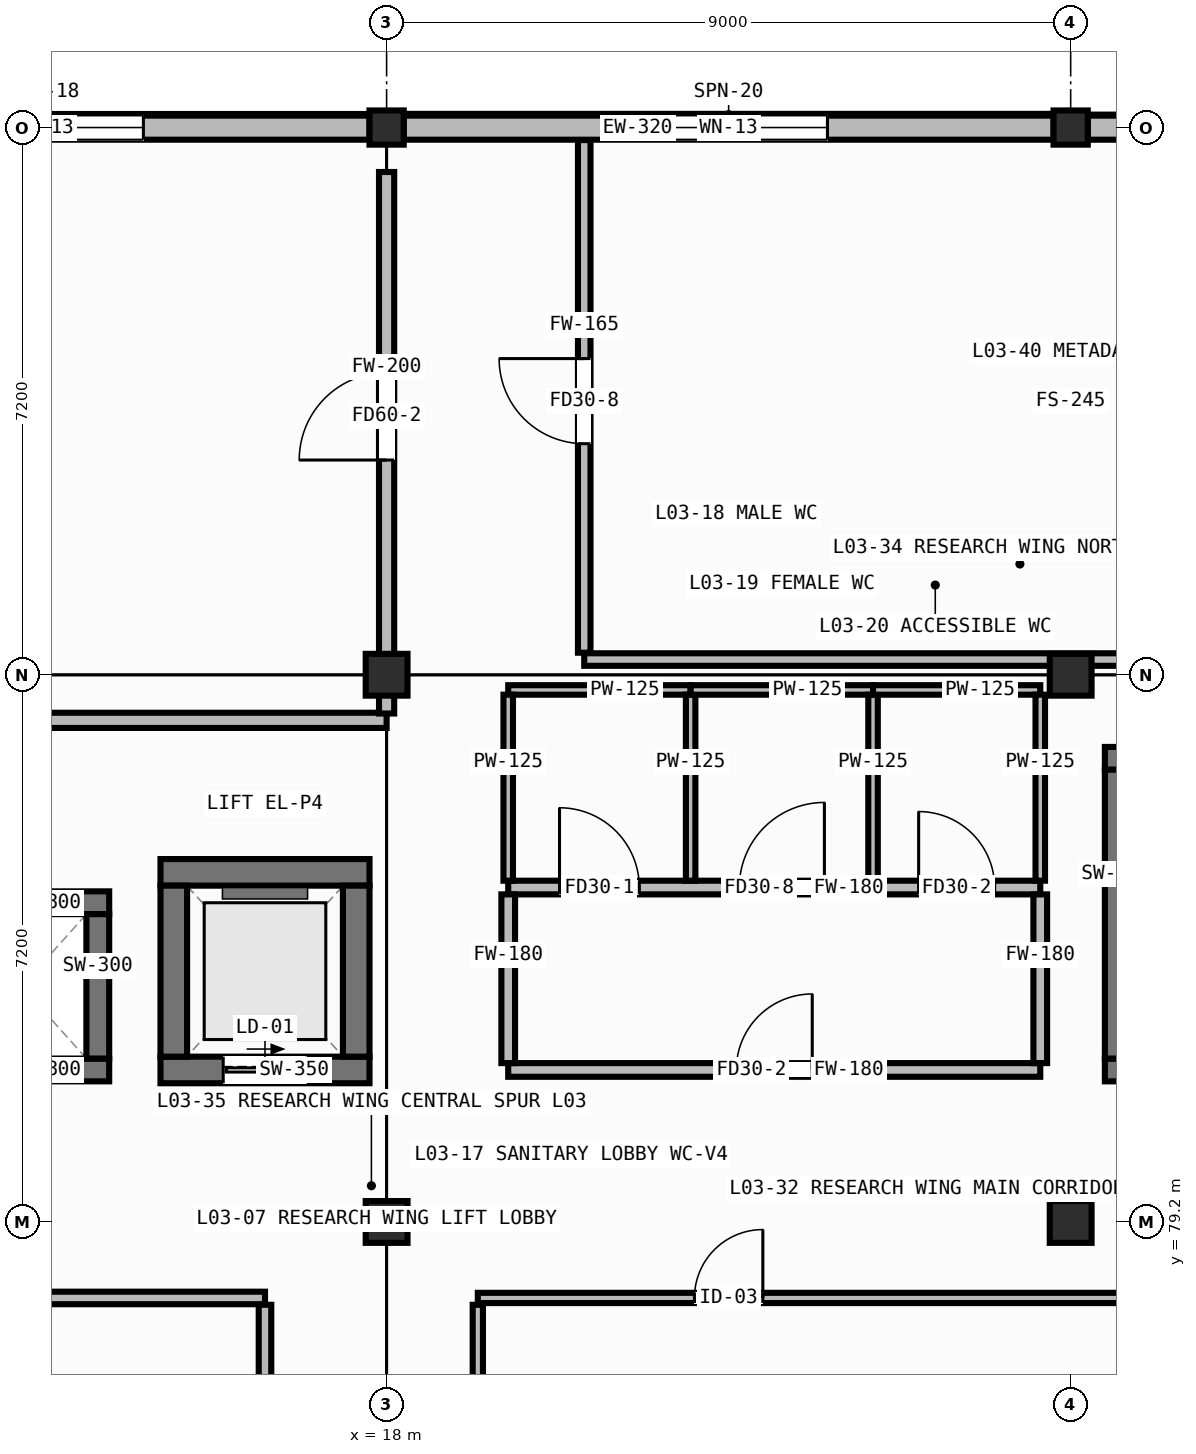
"""IFC4 building model, lengths in metres.
Left out: names, types, materials, properties, quantities, classifications, styles, units other than length and angle.
Written with IfcOpenShell. Run it as: python <this file> out.ifc"""

import sys

from ifc_helpers import new_model, si_unit, direction, frame, frame_2d, origin, origin_2d, place, context, subcontext, project, spatial, rectangle, hollow_rectangle, extrude, element, fill, save


model = new_model("IFC4")
c1 = context("Model", 3, precision=1e-05, world=origin(), true_north=direction((0.0, 1.0)))
c2 = subcontext(c1, "Body", "Model", "MODEL_VIEW")
j1 = project(units=[si_unit("LENGTHUNIT", "METRE"), si_unit("PLANEANGLEUNIT", "RADIAN")], contexts=[c1])
p1 = place(None, origin())
s1 = spatial("IfcSite", under=j1, at=p1, CompositionType="ELEMENT")
p2 = place(p1, origin())
s2 = spatial("IfcBuilding", under=s1, at=p2, CompositionType="ELEMENT")
p3 = place(p2, frame((0.0, 0.0, 8.8)))
s3 = spatial("IfcBuildingStorey", under=s2, at=p3, CompositionType="ELEMENT", Elevation=8.8)
for number, where, z_axis, x_axis in (
    (1, (18.0, 79.2, 0.0), (0.0, 0.0, 1.0), (1.0, 0.0, 0.0)),
    (2, (18.0, 86.4, 0.0), (0.0, 0.0, 1.0), (1.0, 0.0, 0.0)),
):
    element("IfcColumn", number, at=place(p3, frame(where, z_axis=z_axis, x_axis=x_axis)), inside=s3, PredefinedType="COLUMN", context=c2, shape_type="SweptSolid", body=[
        extrude(hollow_rectangle(XDim=0.55, YDim=0.55, WallThickness=0.022, at=origin_2d()), origin(), (0.0, 0.0, 1.0), 4.0),
    ])
p4 = place(p3, frame((18.0, 93.6, 0.0), z_axis=(0.0, 0.0, 1.0), x_axis=(1.0, 0.0, 0.0)))
e3 = element("IfcColumn", 3, at=p4, inside=s3, PredefinedType="COLUMN", context=c2, shape_type="SweptSolid", body=[
    extrude(hollow_rectangle(XDim=0.45, YDim=0.45, WallThickness=0.019, at=origin_2d()), origin(), (0.0, 0.0, 1.0), 4.0),
])
for number, where, z_axis, x_axis in (
    (4, (27.0, 79.2, 0.0), (0.0, 0.0, 1.0), (1.0, 0.0, 0.0)),
    (5, (27.0, 86.4, 0.0), (0.0, 0.0, 1.0), (1.0, 0.0, 0.0)),
):
    element("IfcColumn", number, at=place(p3, frame(where, z_axis=z_axis, x_axis=x_axis)), inside=s3, PredefinedType="COLUMN", context=c2, shape_type="SweptSolid", body=[
        extrude(hollow_rectangle(XDim=0.55, YDim=0.55, WallThickness=0.022, at=origin_2d()), origin(), (0.0, 0.0, 1.0), 4.0),
    ])
p5 = place(p3, frame((27.0, 93.6, 0.0), z_axis=(0.0, 0.0, 1.0), x_axis=(1.0, 0.0, 0.0)))
e6 = element("IfcColumn", 6, at=p5, inside=s3, PredefinedType="COLUMN", context=c2, shape_type="SweptSolid", body=[
    extrude(hollow_rectangle(XDim=0.45, YDim=0.45, WallThickness=0.019, at=origin_2d()), origin(), (0.0, 0.0, 1.0), 4.0),
])
p6 = place(p3, frame((17.775, 93.6, 0.0), z_axis=(0.0, 0.0, 1.0), x_axis=(-1.0, 0.0, 0.0)))
e7 = element("IfcWall", 7, at=p6, inside=s3, PredefinedType="STANDARD", context=c2, shape_type="SweptSolid", body=[
    extrude(rectangle(XDim=8.55, YDim=0.32, at=frame_2d((4.275, 0.0))), origin(), (0.0, 0.0, 1.0), 3.295),
])
p7 = place(p6, frame((2.975, 0.0, 0.85)))
e8 = element("IfcOpeningElement", 8, at=p7, cuts=e7, PredefinedType="OPENING", context=c2, shape_type="SweptSolid", body=[
    extrude(rectangle(XDim=2.6, YDim=1.6, at=frame_2d((1.3, 0.8))), frame((0.0, 0.172, 0.0), z_axis=(0.0, -1.0, 0.0), x_axis=(1.0, 0.0, 0.0)), (0.0, 0.0, 1.0), 0.344),
])
p8 = place(p3, frame((26.775, 93.6, 0.0), z_axis=(0.0, 0.0, 1.0), x_axis=(-1.0, 0.0, 0.0)))
e9 = element("IfcWall", 9, at=p8, inside=s3, PredefinedType="STANDARD", context=c2, shape_type="SweptSolid", body=[
    extrude(rectangle(XDim=8.55, YDim=0.32, at=frame_2d((4.275, 0.0))), origin(), (0.0, 0.0, 1.0), 3.295),
])
p9 = place(p8, frame((2.975, 0.0, 0.85)))
e10 = element("IfcOpeningElement", 10, at=p9, cuts=e9, PredefinedType="OPENING", context=c2, shape_type="SweptSolid", body=[
    extrude(rectangle(XDim=2.6, YDim=1.6, at=frame_2d((1.3, 0.8))), frame((0.0, 0.172, 0.0), z_axis=(0.0, -1.0, 0.0), x_axis=(1.0, 0.0, 0.0)), (0.0, 0.0, 1.0), 0.344),
])
p10 = place(p3, frame((35.775, 93.6, 0.0), z_axis=(0.0, 0.0, 1.0), x_axis=(-1.0, 0.0, 0.0)))
e11 = element("IfcWall", 11, at=p10, inside=s3, PredefinedType="STANDARD", context=c2, shape_type="SweptSolid", body=[
    extrude(rectangle(XDim=8.55, YDim=0.32, at=frame_2d((4.275, 0.0))), origin(), (0.0, 0.0, 1.0), 3.295),
])
p11 = place(p10, frame((2.975, 0.0, 0.85)))
e12 = element("IfcOpeningElement", 12, at=p11, cuts=e11, PredefinedType="OPENING", context=c2, shape_type="SweptSolid", body=[
    extrude(rectangle(XDim=2.6, YDim=1.6, at=frame_2d((1.3, 0.8))), frame((0.0, 0.172, 0.0), z_axis=(0.0, -1.0, 0.0), x_axis=(1.0, 0.0, 0.0)), (0.0, 0.0, 1.0), 0.344),
])
p12 = place(p3, frame((27.45, 81.2, 0.0), z_axis=(0.0, 0.0, 1.0), x_axis=(1.0, 0.0, 0.0)))
e13 = element("IfcWall", 13, at=p12, inside=s3, PredefinedType="SHEAR", context=c2, shape_type="SweptSolid", body=[
    extrude(rectangle(XDim=8.1, YDim=0.3, at=frame_2d((4.05, 0.0))), origin(), (0.0, 0.0, 1.0), 3.745),
])
p13 = place(p12, frame((0.5, 0.0, 0.0)))
e14 = element("IfcOpeningElement", 14, at=p13, cuts=e13, PredefinedType="OPENING", context=c2, shape_type="SweptSolid", body=[
    extrude(rectangle(XDim=1.2, YDim=2.1, at=frame_2d((0.6, 1.05))), frame((0.0, 0.162, 0.0), z_axis=(0.0, -1.0, 0.0), x_axis=(1.0, 0.0, 0.0)), (0.0, 0.0, 1.0), 0.324),
])
p14 = place(p3, frame((27.45, 85.3, 0.0), z_axis=(0.0, 0.0, 1.0), x_axis=(1.0, 0.0, 0.0)))
e15 = element("IfcWall", 15, at=p14, inside=s3, PredefinedType="SHEAR", context=c2, shape_type="SweptSolid", body=[
    extrude(rectangle(XDim=8.1, YDim=0.3, at=frame_2d((4.05, 0.0))), origin(), (0.0, 0.0, 1.0), 3.745),
])
p15 = place(p3, frame((27.6, 81.35, 0.0), z_axis=(0.0, 0.0, 1.0), x_axis=(0.0, 1.0, 0.0)))
e16 = element("IfcWall", 16, at=p15, inside=s3, PredefinedType="SHEAR", context=c2, shape_type="SweptSolid", body=[
    extrude(rectangle(XDim=3.8, YDim=0.3, at=frame_2d((1.9, 0.0))), origin(), (0.0, 0.0, 1.0), 3.745),
])
p16 = place(p3, frame((15.025, 81.2, 0.0), z_axis=(0.0, 0.0, 1.0), x_axis=(1.0, 0.0, 0.0)))
e17 = element("IfcWall", 17, at=p16, inside=s3, PredefinedType="SHEAR", context=c2, shape_type="SweptSolid", body=[
    extrude(rectangle(XDim=2.75, YDim=0.35, at=frame_2d((1.375, 0.0))), origin(), (0.0, 0.0, 1.0), 3.745),
])
p17 = place(p16, frame((0.825, 0.0, 0.0)))
e18 = element("IfcOpeningElement", 18, at=p17, cuts=e17, PredefinedType="OPENING", context=c2, shape_type="SweptSolid", body=[
    extrude(rectangle(XDim=1.1, YDim=2.1, at=frame_2d((0.55, 1.05))), frame((0.0, 0.187, 0.0), z_axis=(0.0, -1.0, 0.0), x_axis=(1.0, 0.0, 0.0)), (0.0, 0.0, 1.0), 0.374),
])
p18 = place(p3, frame((15.025, 83.8, 0.0), z_axis=(0.0, 0.0, 1.0), x_axis=(1.0, 0.0, 0.0)))
e19 = element("IfcWall", 19, at=p18, inside=s3, PredefinedType="SHEAR", context=c2, shape_type="SweptSolid", body=[
    extrude(rectangle(XDim=2.75, YDim=0.35, at=frame_2d((1.375, 0.0))), origin(), (0.0, 0.0, 1.0), 3.745),
])
for number, where, z_axis, x_axis in (
    (20, (15.2, 81.375, 0.0), (0.0, 0.0, 1.0), (0.0, 1.0, 0.0)),
    (21, (17.6, 81.375, 0.0), (0.0, 0.0, 1.0), (0.0, 1.0, 0.0)),
):
    element("IfcWall", number, at=place(p3, frame(where, z_axis=z_axis, x_axis=x_axis)), inside=s3, PredefinedType="SHEAR", context=c2, shape_type="SweptSolid", body=[
        extrude(rectangle(XDim=2.25, YDim=0.35, at=frame_2d((1.125, 0.0))), origin(), (0.0, 0.0, 1.0), 3.745),
    ])
for number, where, z_axis, x_axis in (
    (22, (12.05, 81.2, 0.0), (0.0, 0.0, 1.0), (1.0, 0.0, 0.0)),
    (23, (12.05, 83.4, 0.0), (0.0, 0.0, 1.0), (1.0, 0.0, 0.0)),
):
    element("IfcWall", number, at=place(p3, frame(where, z_axis=z_axis, x_axis=x_axis)), inside=s3, PredefinedType="SHEAR", context=c2, shape_type="SweptSolid", body=[
        extrude(rectangle(XDim=2.3, YDim=0.3, at=frame_2d((1.15, 0.0))), origin(), (0.0, 0.0, 1.0), 3.745),
    ])
p19 = place(p3, frame((14.2, 81.35, 0.0), z_axis=(0.0, 0.0, 1.0), x_axis=(0.0, 1.0, 0.0)))
e24 = element("IfcWall", 24, at=p19, inside=s3, PredefinedType="SHEAR", context=c2, shape_type="SweptSolid", body=[
    extrude(rectangle(XDim=1.9, YDim=0.3, at=frame_2d((0.95, 0.0))), origin(), (0.0, 0.0, 1.0), 3.745),
])
p20 = place(p3, frame((19.6, 81.2, 0.0), z_axis=(0.0, 0.0, 1.0), x_axis=(1.0, 0.0, 0.0)))
e25 = element("IfcWall", 25, at=p20, inside=s3, PredefinedType="PARTITIONING", context=c2, shape_type="SweptSolid", body=[
    extrude(rectangle(XDim=7.0, YDim=0.18, at=frame_2d((3.5, 0.0))), origin(), (0.0, 0.0, 1.0), 3.745),
])
p21 = place(p20, frame((3.0, 0.0, 0.0)))
e26 = element("IfcOpeningElement", 26, at=p21, cuts=e25, PredefinedType="OPENING", context=c2, shape_type="SweptSolid", body=[
    extrude(rectangle(XDim=1.0, YDim=2.08, at=frame_2d((0.5, 1.04))), frame((0.0, 0.102, 0.0), z_axis=(0.0, -1.0, 0.0), x_axis=(1.0, 0.0, 0.0)), (0.0, 0.0, 1.0), 0.204),
])
p22 = place(p3, frame((19.6, 83.6, 0.0), z_axis=(0.0, 0.0, 1.0), x_axis=(1.0, 0.0, 0.0)))
e27 = element("IfcWall", 27, at=p22, inside=s3, PredefinedType="PARTITIONING", context=c2, shape_type="SweptSolid", body=[
    extrude(rectangle(XDim=7.0, YDim=0.18, at=frame_2d((3.5, 0.0))), origin(), (0.0, 0.0, 1.0), 3.745),
])
p23 = place(p22, frame((0.675, 0.0, 0.0)))
e28 = element("IfcOpeningElement", 28, at=p23, cuts=e27, PredefinedType="OPENING", context=c2, shape_type="SweptSolid", body=[
    extrude(rectangle(XDim=1.05, YDim=2.1, at=frame_2d((0.525, 1.05))), frame((0.0, 0.102, 0.0), z_axis=(0.0, -1.0, 0.0), x_axis=(1.0, 0.0, 0.0)), (0.0, 0.0, 1.0), 0.204),
])
p24 = place(p22, frame((3.04, 0.0, 0.0)))
e29 = element("IfcOpeningElement", 29, at=p24, cuts=e27, PredefinedType="OPENING", context=c2, shape_type="SweptSolid", body=[
    extrude(rectangle(XDim=1.12, YDim=2.08, at=frame_2d((0.56, 1.04))), frame((0.0, 0.102, 0.0), z_axis=(0.0, -1.0, 0.0), x_axis=(1.0, 0.0, 0.0)), (0.0, 0.0, 1.0), 0.204),
])
p25 = place(p22, frame((5.4, 0.0, 0.0)))
e30 = element("IfcOpeningElement", 30, at=p25, cuts=e27, PredefinedType="OPENING", context=c2, shape_type="SweptSolid", body=[
    extrude(rectangle(XDim=1.0, YDim=2.08, at=frame_2d((0.5, 1.04))), frame((0.0, 0.102, 0.0), z_axis=(0.0, -1.0, 0.0), x_axis=(1.0, 0.0, 0.0)), (0.0, 0.0, 1.0), 0.204),
])
for number, where, z_axis, x_axis in (
    (31, (19.6, 81.29, 0.0), (0.0, 0.0, 1.0), (0.0, 1.0, 0.0)),
    (32, (26.6, 81.29, 0.0), (0.0, 0.0, 1.0), (0.0, 1.0, 0.0)),
):
    element("IfcWall", number, at=place(p3, frame(where, z_axis=z_axis, x_axis=x_axis)), inside=s3, PredefinedType="PARTITIONING", context=c2, shape_type="SweptSolid", body=[
        extrude(rectangle(XDim=2.22, YDim=0.18, at=frame_2d((1.11, 0.0))), origin(), (0.0, 0.0, 1.0), 3.745),
    ])
p26 = place(p3, frame((19.6, 86.2, 0.0), z_axis=(0.0, 0.0, 1.0), x_axis=(1.0, 0.0, 0.0)))
e33 = element("IfcWall", 33, at=p26, inside=s3, PredefinedType="PARTITIONING", context=c2, shape_type="SweptSolid", body=[
    extrude(rectangle(XDim=2.4, YDim=0.125, at=frame_2d((1.2, 0.0))), origin(), (0.0, 0.0, 1.0), 3.025),
])
for number, where, z_axis, x_axis in (
    (34, (19.6, 83.69, 0.0), (0.0, 0.0, 1.0), (0.0, 1.0, 0.0)),
    (35, (22.0, 83.69, 0.0), (0.0, 0.0, 1.0), (0.0, 1.0, 0.0)),
):
    element("IfcWall", number, at=place(p3, frame(where, z_axis=z_axis, x_axis=x_axis)), inside=s3, PredefinedType="PARTITIONING", context=c2, shape_type="SweptSolid", body=[
        extrude(rectangle(XDim=2.448, YDim=0.125, at=frame_2d((1.224, 0.0))), origin(), (0.0, 0.0, 1.0), 3.745),
    ])
p27 = place(p3, frame((22.0, 86.2, 0.0), z_axis=(0.0, 0.0, 1.0), x_axis=(1.0, 0.0, 0.0)))
e36 = element("IfcWall", 36, at=p27, inside=s3, PredefinedType="PARTITIONING", context=c2, shape_type="SweptSolid", body=[
    extrude(rectangle(XDim=2.4, YDim=0.125, at=frame_2d((1.2, 0.0))), origin(), (0.0, 0.0, 1.0), 3.025),
])
p28 = place(p3, frame((24.4, 83.69, 0.0), z_axis=(0.0, 0.0, 1.0), x_axis=(0.0, 1.0, 0.0)))
e37 = element("IfcWall", 37, at=p28, inside=s3, PredefinedType="PARTITIONING", context=c2, shape_type="SweptSolid", body=[
    extrude(rectangle(XDim=2.448, YDim=0.125, at=frame_2d((1.224, 0.0))), origin(), (0.0, 0.0, 1.0), 3.745),
])
p29 = place(p3, frame((24.4, 86.2, 0.0), z_axis=(0.0, 0.0, 1.0), x_axis=(1.0, 0.0, 0.0)))
e38 = element("IfcWall", 38, at=p29, inside=s3, PredefinedType="PARTITIONING", context=c2, shape_type="SweptSolid", body=[
    extrude(rectangle(XDim=2.2, YDim=0.125, at=frame_2d((1.1, 0.0))), origin(), (0.0, 0.0, 1.0), 3.025),
])
p30 = place(p3, frame((26.6, 83.69, 0.0), z_axis=(0.0, 0.0, 1.0), x_axis=(0.0, 1.0, 0.0)))
e39 = element("IfcWall", 39, at=p30, inside=s3, PredefinedType="PARTITIONING", context=c2, shape_type="SweptSolid", body=[
    extrude(rectangle(XDim=2.448, YDim=0.125, at=frame_2d((1.224, 0.0))), origin(), (0.0, 0.0, 1.0), 3.745),
])
p31 = place(p3, frame((0.155, 78.2, 0.0), z_axis=(0.0, 0.0, 1.0), x_axis=(1.0, 0.0, 0.0)))
e40 = element("IfcWall", 40, at=p31, inside=s3, PredefinedType="PARTITIONING", context=c2, shape_type="SweptSolid", body=[
    extrude(rectangle(XDim=16.245, YDim=0.165, at=frame_2d((8.123, 0.0))), origin(), (0.0, 0.0, 1.0), 3.745),
])
p32 = place(p31, frame((3.62, 0.0, 0.0)))
e41 = element("IfcOpeningElement", 41, at=p32, cuts=e40, PredefinedType="OPENING", context=c2, shape_type="SweptSolid", body=[
    extrude(rectangle(XDim=1.45, YDim=2.1, at=frame_2d((0.725, 1.05))), frame((0.0, 0.094, 0.0), z_axis=(0.0, -1.0, 0.0), x_axis=(1.0, 0.0, 0.0)), (0.0, 0.0, 1.0), 0.189),
])
p33 = place(p3, frame((16.4, 57.635, 0.0), z_axis=(0.0, 0.0, 1.0), x_axis=(0.0, 1.0, 0.0)))
e42 = element("IfcWall", 42, at=p33, inside=s3, PredefinedType="PARTITIONING", context=c2, shape_type="SweptSolid", body=[
    extrude(rectangle(XDim=20.475, YDim=0.165, at=frame_2d((10.238, 0.0))), origin(), (0.0, 0.0, 1.0), 3.745),
])
p34 = place(p3, frame((19.2, 78.2, 0.0), z_axis=(0.0, 0.0, 1.0), x_axis=(1.0, 0.0, 0.0)))
e43 = element("IfcWall", 43, at=p34, inside=s3, PredefinedType="PARTITIONING", context=c2, shape_type="SweptSolid", body=[
    extrude(rectangle(XDim=16.765, YDim=0.135, at=frame_2d((8.383, 0.0))), origin(), (0.0, 0.0, 1.0), 3.745),
])
p35 = place(p34, frame((2.85, 0.0, 0.0)))
e44 = element("IfcOpeningElement", 44, at=p35, cuts=e43, PredefinedType="OPENING", context=c2, shape_type="SweptSolid", body=[
    extrude(rectangle(XDim=0.9, YDim=2.02, at=frame_2d((0.45, 1.01))), frame((0.0, 0.08, 0.0), z_axis=(0.0, -1.0, 0.0), x_axis=(1.0, 0.0, 0.0)), (0.0, 0.0, 1.0), 0.159),
])
p36 = place(p3, frame((19.2, 68.49, 0.0), z_axis=(0.0, 0.0, 1.0), x_axis=(0.0, 1.0, 0.0)))
e45 = element("IfcWall", 45, at=p36, inside=s3, PredefinedType="PARTITIONING", context=c2, shape_type="SweptSolid", body=[
    extrude(rectangle(XDim=9.62, YDim=0.135, at=frame_2d((4.81, 0.0))), origin(), (0.0, 0.0, 1.0), 3.745),
])
p37 = place(p3, frame((0.155, 85.8, 0.0), z_axis=(0.0, 0.0, 1.0), x_axis=(1.0, 0.0, 0.0)))
e46 = element("IfcWall", 46, at=p37, inside=s3, PredefinedType="PARTITIONING", context=c2, shape_type="SweptSolid", body=[
    extrude(rectangle(XDim=17.845, YDim=0.2, at=frame_2d((8.922, 0.0))), origin(), (0.0, 0.0, 1.0), 3.745),
])
p38 = place(p3, frame((18.0, 85.89, 0.0), z_axis=(0.0, 0.0, 1.0), x_axis=(0.0, 1.0, 0.0)))
e47 = element("IfcWall", 47, at=p38, inside=s3, PredefinedType="PARTITIONING", context=c2, shape_type="SweptSolid", body=[
    extrude(rectangle(XDim=7.125, YDim=0.2, at=frame_2d((3.562, 0.0))), origin(), (0.0, 0.0, 1.0), 3.025),
])
p39 = place(p38, frame((3.335, 0.0, 0.0)))
e48 = element("IfcOpeningElement", 48, at=p39, cuts=e47, PredefinedType="OPENING", context=c2, shape_type="SweptSolid", body=[
    extrude(rectangle(XDim=1.15, YDim=2.1, at=frame_2d((0.575, 1.05))), frame((0.0, 0.112, 0.0), z_axis=(0.0, -1.0, 0.0), x_axis=(1.0, 0.0, 0.0)), (0.0, 0.0, 1.0), 0.224),
])
p40 = place(p3, frame((20.6, 86.6, 0.0), z_axis=(0.0, 0.0, 1.0), x_axis=(1.0, 0.0, 0.0)))
e49 = element("IfcWall", 49, at=p40, inside=s3, PredefinedType="PARTITIONING", context=c2, shape_type="SweptSolid", body=[
    extrude(rectangle(XDim=14.945, YDim=0.165, at=frame_2d((7.472, 0.0))), origin(), (0.0, 0.0, 1.0), 3.025),
])
p41 = place(p3, frame((20.6, 86.69, 0.0), z_axis=(0.0, 0.0, 1.0), x_axis=(0.0, 1.0, 0.0)))
e50 = element("IfcWall", 50, at=p41, inside=s3, PredefinedType="PARTITIONING", context=c2, shape_type="SweptSolid", body=[
    extrude(rectangle(XDim=6.745, YDim=0.165, at=frame_2d((3.373, 0.0))), origin(), (0.0, 0.0, 1.0), 3.745),
])
p42 = place(p41, frame((2.75, 0.0, 0.0)))
e51 = element("IfcOpeningElement", 51, at=p42, cuts=e50, PredefinedType="OPENING", context=c2, shape_type="SweptSolid", body=[
    extrude(rectangle(XDim=1.12, YDim=2.08, at=frame_2d((0.56, 1.04))), frame((0.0, 0.094, 0.0), z_axis=(0.0, -1.0, 0.0), x_axis=(1.0, 0.0, 0.0)), (0.0, 0.0, 1.0), 0.189),
])
p43 = place(p7, origin())
e52 = element("IfcWindow", 52, at=p43, inside=s3, PartitioningType="DOUBLE_PANEL_VERTICAL", PredefinedType="WINDOW", context=c2, shape_type="SweptSolid", body=[
    extrude(rectangle(XDim=2.6, YDim=1.6, at=frame_2d((1.3, 0.8))), frame((0.0, 0.03, 0.0), z_axis=(0.0, -1.0, 0.0), x_axis=(1.0, 0.0, 0.0)), (0.0, 0.0, 1.0), 0.06),
])
fill(e8, e52)
p44 = place(p9, origin())
e53 = element("IfcWindow", 53, at=p44, inside=s3, PartitioningType="DOUBLE_PANEL_VERTICAL", PredefinedType="WINDOW", context=c2, shape_type="SweptSolid", body=[
    extrude(rectangle(XDim=2.6, YDim=1.6, at=frame_2d((1.3, 0.8))), frame((0.0, 0.03, 0.0), z_axis=(0.0, -1.0, 0.0), x_axis=(1.0, 0.0, 0.0)), (0.0, 0.0, 1.0), 0.06),
])
fill(e10, e53)
p45 = place(p17, origin())
e54 = element("IfcDoor", 54, at=p45, inside=s3, OperationType="SLIDING_TO_LEFT", PredefinedType="DOOR", context=c2, shape_type="SweptSolid", body=[
    extrude(rectangle(XDim=1.1, YDim=2.1, at=frame_2d((0.55, 1.05))), frame((0.0, 0.025, 0.0), z_axis=(0.0, -1.0, 0.0), x_axis=(1.0, 0.0, 0.0)), (0.0, 0.0, 1.0), 0.05),
])
fill(e18, e54)
p46 = place(p21, origin())
e55 = element("IfcDoor", 55, at=p46, inside=s3, OperationType="SINGLE_SWING_RIGHT", PredefinedType="DOOR", context=c2, shape_type="SweptSolid", body=[
    extrude(rectangle(XDim=1.0, YDim=2.08, at=frame_2d((0.5, 1.04))), frame((0.0, 0.025, 0.0), z_axis=(0.0, -1.0, 0.0), x_axis=(1.0, 0.0, 0.0)), (0.0, 0.0, 1.0), 0.05),
])
fill(e26, e55)
p47 = place(p23, origin())
e56 = element("IfcDoor", 56, at=p47, inside=s3, OperationType="SINGLE_SWING_LEFT", PredefinedType="DOOR", context=c2, shape_type="SweptSolid", body=[
    extrude(rectangle(XDim=1.05, YDim=2.1, at=frame_2d((0.525, 1.05))), frame((0.0, 0.025, 0.0), z_axis=(0.0, -1.0, 0.0), x_axis=(1.0, 0.0, 0.0)), (0.0, 0.0, 1.0), 0.05),
])
fill(e28, e56)
p48 = place(p24, origin())
e57 = element("IfcDoor", 57, at=p48, inside=s3, OperationType="SINGLE_SWING_RIGHT", PredefinedType="DOOR", context=c2, shape_type="SweptSolid", body=[
    extrude(rectangle(XDim=1.12, YDim=2.08, at=frame_2d((0.56, 1.04))), frame((0.0, 0.025, 0.0), z_axis=(0.0, -1.0, 0.0), x_axis=(1.0, 0.0, 0.0)), (0.0, 0.0, 1.0), 0.05),
])
fill(e29, e57)
p49 = place(p25, origin())
e58 = element("IfcDoor", 58, at=p49, inside=s3, OperationType="SINGLE_SWING_LEFT", PredefinedType="DOOR", context=c2, shape_type="SweptSolid", body=[
    extrude(rectangle(XDim=1.0, YDim=2.08, at=frame_2d((0.5, 1.04))), frame((0.0, 0.025, 0.0), z_axis=(0.0, -1.0, 0.0), x_axis=(1.0, 0.0, 0.0)), (0.0, 0.0, 1.0), 0.05),
])
fill(e30, e58)
p50 = place(p35, origin())
e59 = element("IfcDoor", 59, at=p50, inside=s3, OperationType="SINGLE_SWING_RIGHT", PredefinedType="DOOR", context=c2, shape_type="SweptSolid", body=[
    extrude(rectangle(XDim=0.9, YDim=2.02, at=frame_2d((0.45, 1.01))), frame((0.0, 0.025, 0.0), z_axis=(0.0, -1.0, 0.0), x_axis=(1.0, 0.0, 0.0)), (0.0, 0.0, 1.0), 0.05),
])
fill(e44, e59)
p51 = place(p39, origin())
e60 = element("IfcDoor", 60, at=p51, inside=s3, OperationType="SINGLE_SWING_LEFT", PredefinedType="DOOR", context=c2, shape_type="SweptSolid", body=[
    extrude(rectangle(XDim=1.15, YDim=2.1, at=frame_2d((0.575, 1.05))), frame((0.0, 0.025, 0.0), z_axis=(0.0, -1.0, 0.0), x_axis=(1.0, 0.0, 0.0)), (0.0, 0.0, 1.0), 0.05),
])
fill(e48, e60)
p52 = place(p42, origin())
e61 = element("IfcDoor", 61, at=p52, inside=s3, OperationType="SINGLE_SWING_RIGHT", PredefinedType="DOOR", context=c2, shape_type="SweptSolid", body=[
    extrude(rectangle(XDim=1.12, YDim=2.08, at=frame_2d((0.56, 1.04))), frame((0.0, 0.025, 0.0), z_axis=(0.0, -1.0, 0.0), x_axis=(1.0, 0.0, 0.0)), (0.0, 0.0, 1.0), 0.05),
])
fill(e51, e61)
save(model, sys.argv[1])
